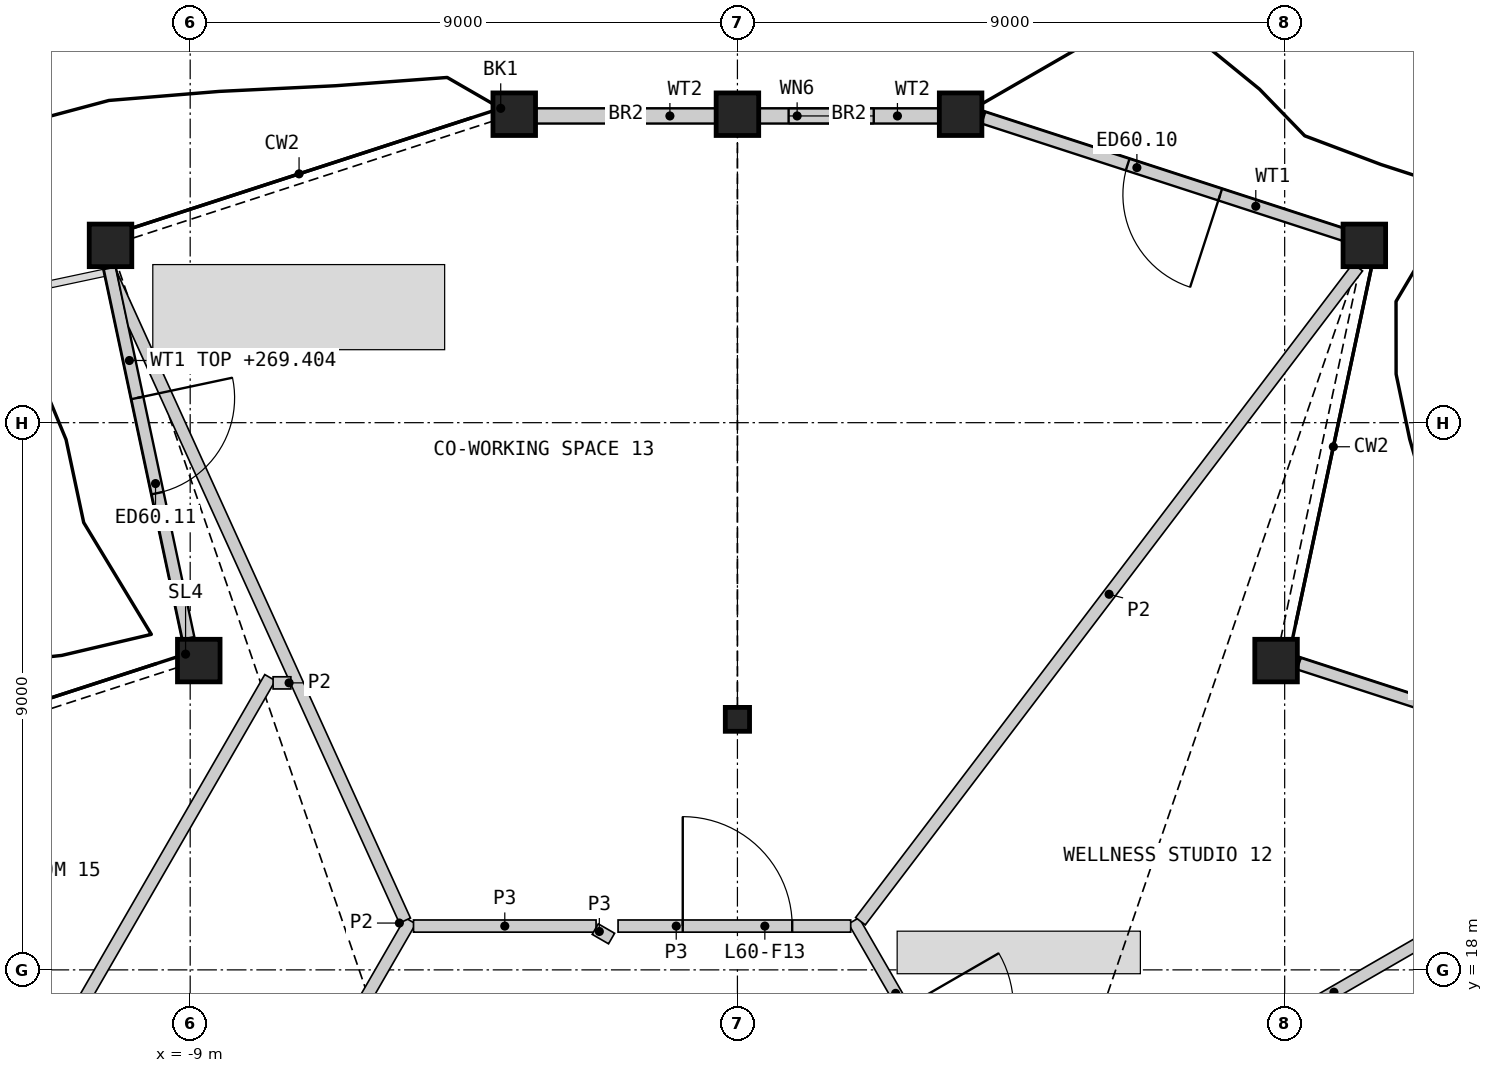
"""IFC4 building model, lengths in metres.
Left out: names, types, materials, properties, quantities, classifications, styles, units other than length and angle.
Written with IfcOpenShell. Run it as: python <this file> out.ifc"""

import sys

from ifc_helpers import new_model, si_unit, direction, frame, frame_2d, origin, origin_2d, place, context, subcontext, project, spatial, polyline, rectangle, hollow_rectangle, i_section, outline, extrude, element, fill, save


model = new_model("IFC4")
c1 = context("Model", 3, precision=1e-05, world=origin(), true_north=direction((0.0, 1.0)))
c2 = subcontext(c1, "Body", "Model", "MODEL_VIEW")
j1 = project(units=[si_unit("LENGTHUNIT", "METRE"), si_unit("PLANEANGLEUNIT", "RADIAN")], contexts=[c1])
p1 = place(None, origin())
s1 = spatial("IfcSite", under=j1, at=p1, CompositionType="ELEMENT")
p2 = place(p1, origin())
s2 = spatial("IfcBuilding", under=s1, at=p2, CompositionType="ELEMENT")
p3 = place(p2, frame((0.0, 0.0, 267.0)))
s3 = spatial("IfcBuildingStorey", under=s2, at=p3, CompositionType="ELEMENT", Elevation=267.0)
for number, where, z_axis, x_axis in (
    (1, (8.859, 23.087, 0.0), (0.0, 0.0, 1.0), (1.0, 0.0, 0.0)),
    (2, (10.31, 29.916, 0.0), (0.0, 0.0, 1.0), (1.0, 0.0, 0.0)),
    (3, (3.67, 32.073, 0.0), (0.0, 0.0, 1.0), (1.0, 0.0, 0.0)),
    (4, (0.0, 32.073, 0.0), (0.0, 0.0, 1.0), (1.0, 0.0, 0.0)),
    (5, (-3.67, 32.073, 0.0), (0.0, 0.0, 1.0), (1.0, 0.0, 0.0)),
    (6, (-10.31, 29.916, 0.0), (0.0, 0.0, 1.0), (1.0, 0.0, 0.0)),
    (7, (-8.859, 23.087, 0.0), (0.0, 0.0, 1.0), (1.0, 0.0, 0.0)),
):
    element("IfcColumn", number, at=place(p3, frame(where, z_axis=z_axis, x_axis=x_axis)), inside=s3, PredefinedType="COLUMN", context=c2, shape_type="SweptSolid", body=[
        extrude(hollow_rectangle(XDim=0.7, YDim=0.7, WallThickness=0.045, at=origin_2d()), origin(), (0.0, 0.0, 1.0), 3.6),
    ])
p4 = place(p3, frame((0.0, 22.121, 0.0), z_axis=(0.0, 0.0, 1.0), x_axis=(1.0, 0.0, 0.0)))
e8 = element("IfcColumn", 8, at=p4, inside=s3, PredefinedType="COLUMN", context=c2, shape_type="SweptSolid", body=[
    extrude(i_section(OverallWidth=0.399, OverallDepth=0.393, WebThickness=0.023, FlangeThickness=0.037, at=origin_2d()), origin(), (0.0, 0.0, 1.0), 3.6),
])
p5 = place(p3, frame((15.201, 21.098, 0.0), z_axis=(0.0, 0.0, 1.0), x_axis=(-0.95105665506, 0.309016567299, 0.0)))
e9 = element("IfcWall", 9, at=p5, inside=s3, PredefinedType="SOLIDWALL", context=c2, shape_type="SweptSolid", body=[
    extrude(rectangle(XDim=6.275, YDim=0.2, at=frame_2d((3.137, 0.0))), origin(), (0.0, 0.0, 1.0), 2.701),
])
p6 = place(p5, frame((2.186, 0.0, 0.0)))
e10 = element("IfcOpeningElement", 10, at=p6, cuts=e9, PredefinedType="OPENING", context=c2, shape_type="SweptSolid", body=[
    extrude(rectangle(XDim=1.6, YDim=2.4, at=frame_2d((0.8, 1.2))), frame((0.0, 0.11, 0.0), z_axis=(0.0, -1.0, 0.0), x_axis=(1.0, 0.0, 0.0)), (0.0, 0.0, 1.0), 0.22),
])
p7 = place(p3, frame((10.018, 30.074, 0.0), z_axis=(0.0, 0.0, 1.0), x_axis=(-0.951062060282, 0.308999931218, 0.0)))
e11 = element("IfcWall", 11, at=p7, inside=s3, PredefinedType="SOLIDWALL", context=c2, shape_type="SweptSolid", body=[
    extrude(rectangle(XDim=6.281, YDim=0.2, at=frame_2d((3.14, 0.0))), origin(), (0.0, 0.0, 1.0), 2.701),
])
p8 = place(p7, frame((2.186, 0.0, 0.0)))
e12 = element("IfcOpeningElement", 12, at=p8, cuts=e11, PredefinedType="OPENING", context=c2, shape_type="SweptSolid", body=[
    extrude(rectangle(XDim=1.6, YDim=2.4, at=frame_2d((0.8, 1.2))), frame((0.0, 0.11, 0.0), z_axis=(0.0, -1.0, 0.0), x_axis=(1.0, 0.0, 0.0)), (0.0, 0.0, 1.0), 0.22),
])
p9 = place(p3, frame((3.392, 32.045, 0.0), z_axis=(0.0, 0.0, 1.0), x_axis=(-1.0, 0.0, 0.0)))
e13 = element("IfcWall", 13, at=p9, inside=s3, PredefinedType="SOLIDWALL", context=c2, shape_type="SweptSolid", body=[
    extrude(rectangle(XDim=3.042, YDim=0.25, at=frame_2d((1.521, 0.0))), origin(), (0.0, 0.0, 1.0), 2.701),
])
p10 = place(p9, frame((1.15, 0.0, 1.9)))
e14 = element("IfcOpeningElement", 14, at=p10, cuts=e13, PredefinedType="OPENING", context=c2, shape_type="SweptSolid", body=[
    extrude(rectangle(XDim=1.4, YDim=0.6, at=frame_2d((0.7, 0.3))), frame((0.0, 0.135, 0.0), z_axis=(0.0, -1.0, 0.0), x_axis=(1.0, 0.0, 0.0)), (0.0, 0.0, 1.0), 0.27),
])
p11 = place(p3, frame((-0.35, 32.045, 0.0), z_axis=(0.0, 0.0, 1.0), x_axis=(-1.0, 0.0, 0.0)))
e15 = element("IfcWall", 15, at=p11, inside=s3, PredefinedType="SOLIDWALL", context=c2, shape_type="SweptSolid", body=[
    extrude(rectangle(XDim=3.042, YDim=0.25, at=frame_2d((1.521, 0.0))), origin(), (0.0, 0.0, 1.0), 2.701),
])
p12 = place(p3, frame((-10.324, 29.545, 0.0), z_axis=(0.0, 0.0, 1.0), x_axis=(0.207930490886, -0.978143604467, 0.0)))
e16 = element("IfcWall", 16, at=p12, inside=s3, PredefinedType="SOLIDWALL", context=c2, shape_type="SweptSolid", body=[
    extrude(rectangle(XDim=6.228, YDim=0.2, at=frame_2d((3.114, 0.0))), origin(), (0.0, 0.0, 1.0), 2.404),
])
p13 = place(p12, frame((2.186, 0.0, 0.0)))
e17 = element("IfcOpeningElement", 17, at=p13, cuts=e16, PredefinedType="OPENING", context=c2, shape_type="SweptSolid", body=[
    extrude(rectangle(XDim=1.6, YDim=2.4, at=frame_2d((0.8, 1.2))), frame((0.0, 0.11, 0.0), z_axis=(0.0, -1.0, 0.0), x_axis=(1.0, 0.0, 0.0)), (0.0, 0.0, 1.0), 0.22),
])
p14 = place(p3, frame((-18.976, -4.747, 0.0), z_axis=(0.0, 0.0, 1.0), x_axis=(0.499999852422, 0.866025488988, 0.0)))
e18 = element("IfcWall", 18, at=p14, inside=s3, PredefinedType="PARTITIONING", context=c2, shape_type="SweptSolid", body=[
    extrude(rectangle(XDim=27.198, YDim=0.2, at=frame_2d((13.599, 0.0))), origin(), (0.0, 0.0, 1.0), 3.25),
])
p15 = place(p14, frame((19.886, 0.0, 0.0)))
e19 = element("IfcOpeningElement", 19, at=p15, cuts=e18, PredefinedType="OPENING", context=c2, shape_type="SweptSolid", body=[
    extrude(rectangle(XDim=0.95, YDim=2.1, at=frame_2d((0.475, 1.05))), frame((0.0, 0.11, 0.0), z_axis=(0.0, -1.0, 0.0), x_axis=(1.0, 0.0, 0.0)), (0.0, 0.0, 1.0), 0.22),
])
p16 = place(p14, frame((11.895, 0.0, 0.0)))
e20 = element("IfcOpeningElement", 20, at=p16, cuts=e18, PredefinedType="OPENING", context=c2, shape_type="SweptSolid", body=[
    extrude(rectangle(XDim=1.1, YDim=2.1, at=frame_2d((0.55, 1.05))), frame((0.0, 0.11, 0.0), z_axis=(0.0, -1.0, 0.0), x_axis=(1.0, 0.0, 0.0)), (0.0, 0.0, 1.0), 0.22),
])
p17 = place(p14, frame((1.152, 0.0, 0.0)))
e21 = element("IfcOpeningElement", 21, at=p17, cuts=e18, PredefinedType="OPENING", context=c2, shape_type="SweptSolid", body=[
    extrude(rectangle(XDim=0.95, YDim=2.1, at=frame_2d((0.475, 1.05))), frame((0.0, 0.11, 0.0), z_axis=(0.0, -1.0, 0.0), x_axis=(1.0, 0.0, 0.0)), (0.0, 0.0, 1.0), 0.22),
])
p18 = place(p3, frame((1.913, 18.807, 0.0), z_axis=(0.0, 0.0, 1.0), x_axis=(0.499984524817, -0.866034338201, 0.0)))
e22 = element("IfcWall", 22, at=p18, inside=s3, PredefinedType="PARTITIONING", context=c2, shape_type="SweptSolid", body=[
    extrude(rectangle(XDim=5.51, YDim=0.2, at=frame_2d((2.755, 0.0))), origin(), (0.0, 0.0, 1.0), 3.25),
])
p19 = place(p18, frame((1.655, 0.0, 0.0)))
e23 = element("IfcOpeningElement", 23, at=p19, cuts=e22, PredefinedType="OPENING", context=c2, shape_type="SweptSolid", body=[
    extrude(rectangle(XDim=1.8, YDim=2.1, at=frame_2d((0.9, 1.05))), frame((0.0, 0.11, 0.0), z_axis=(0.0, -1.0, 0.0), x_axis=(1.0, 0.0, 0.0)), (0.0, 0.0, 1.0), 0.22),
])
p20 = place(p3, frame((-1.963, 18.72, 0.0), z_axis=(0.0, 0.0, 1.0), x_axis=(1.0, 0.0, 0.0)))
e24 = element("IfcWall", 24, at=p20, inside=s3, PredefinedType="PARTITIONING", context=c2, shape_type="SweptSolid", body=[
    extrude(rectangle(XDim=3.826, YDim=0.2, at=frame_2d((1.913, 0.0))), origin(), (0.0, 0.0, 1.0), 3.25),
])
p21 = place(p20, frame((1.064, 0.0, 0.0)))
e25 = element("IfcOpeningElement", 25, at=p21, cuts=e24, PredefinedType="OPENING", context=c2, shape_type="SweptSolid", body=[
    extrude(rectangle(XDim=1.8, YDim=2.1, at=frame_2d((0.9, 1.05))), frame((0.0, 0.11, 0.0), z_axis=(0.0, -1.0, 0.0), x_axis=(1.0, 0.0, 0.0)), (0.0, 0.0, 1.0), 0.22),
])
p22 = place(p3, frame((-5.327, 18.72, 0.0), z_axis=(0.0, 0.0, 1.0), x_axis=(1.0, 0.0, 0.0)))
e26 = element("IfcWall", 26, at=p22, inside=s3, PredefinedType="PARTITIONING", context=c2, shape_type="SweptSolid", body=[
    extrude(rectangle(XDim=3.002, YDim=0.2, at=frame_2d((1.501, 0.0))), origin(), (0.0, 0.0, 1.0), 3.25),
])
p23 = place(p3, frame((-2.338, 18.67, 0.0), z_axis=(0.0, 0.0, 1.0), x_axis=(0.866054481515, -0.499949632511, 0.0)))
e27 = element("IfcWall", 27, at=p23, inside=s3, PredefinedType="PARTITIONING", context=c2, shape_type="SweptSolid", body=[
    extrude(rectangle(XDim=0.31, YDim=0.2, at=frame_2d((0.155, 0.0))), origin(), (0.0, 0.0, 1.0), 3.25),
])
p24 = place(p3, frame((-15.591, 9.117, 0.0), z_axis=(0.0, 0.0, 1.0), x_axis=(0.499994281579, 0.866028705291, 0.0)))
e28 = element("IfcWall", 28, at=p24, inside=s3, PredefinedType="PARTITIONING", context=c2, shape_type="SweptSolid", body=[
    extrude(rectangle(XDim=15.808, YDim=0.2, at=frame_2d((7.904, 0.0))), origin(), (0.0, 0.0, 1.0), 2.404),
])
p25 = place(p24, frame((8.283, 0.0, 0.0)))
e29 = element("IfcOpeningElement", 29, at=p25, cuts=e28, PredefinedType="OPENING", context=c2, shape_type="SweptSolid", body=[
    extrude(rectangle(XDim=0.95, YDim=2.1, at=frame_2d((0.475, 1.05))), frame((0.0, 0.11, 0.0), z_axis=(0.0, -1.0, 0.0), x_axis=(1.0, 0.0, 0.0)), (0.0, 0.0, 1.0), 0.22),
])
p26 = place(p3, frame((2.024, 18.8, 0.0), z_axis=(0.0, 0.0, 1.0), x_axis=(0.605225740135, 0.796053894832, 0.0)))
e30 = element("IfcWall", 30, at=p26, inside=s3, PredefinedType="PARTITIONING", context=c2, shape_type="SweptSolid", body=[
    extrude(rectangle(XDim=13.511, YDim=0.2, at=frame_2d((6.756, 0.0))), origin(), (0.0, 0.0, 1.0), 2.404),
])
p27 = place(p3, frame((4.482, 14.557, 0.0), z_axis=(0.0, 0.0, 1.0), x_axis=(0.866030620616, 0.499990964073, 0.0)))
e31 = element("IfcWall", 31, at=p27, inside=s3, PredefinedType="PARTITIONING", context=c2, shape_type="SweptSolid", body=[
    extrude(rectangle(XDim=12.304, YDim=0.2, at=frame_2d((6.152, 0.0))), origin(), (0.0, 0.0, 1.0), 2.404),
])
p28 = place(p3, origin())
e32 = element("IfcWall", 32, at=p28, inside=s3, PredefinedType="PARTITIONING", context=c2, shape_type="SweptSolid", body=[
    extrude(outline(polyline([(-5.56, 18.77), (-10.017, 28.582), (-10.21, 29.491), (-5.377, 18.853), (-5.56, 18.77)])), origin(), (0.0, 0.0, 1.0), 2.404),
])
p29 = place(p3, frame((-7.636, 22.72, 0.0), z_axis=(0.0, 0.0, 1.0), x_axis=(1.0, 0.0, 0.0)))
e33 = element("IfcWall", 33, at=p29, inside=s3, PredefinedType="PARTITIONING", context=c2, shape_type="SweptSolid", body=[
    extrude(rectangle(XDim=0.292, YDim=0.2, at=frame_2d((0.146, 0.0))), origin(), (0.0, 0.0, 1.0), 2.404),
])
p30 = place(p8, origin())
e34 = element("IfcDoor", 34, at=p30, inside=s3, OperationType="DOUBLE_DOOR_SINGLE_SWING", PredefinedType="DOOR", context=c2, shape_type="SweptSolid", body=[
    extrude(rectangle(XDim=1.6, YDim=2.4, at=frame_2d((0.8, 1.2))), frame((0.0, 0.025, 0.0), z_axis=(0.0, -1.0, 0.0), x_axis=(1.0, 0.0, 0.0)), (0.0, 0.0, 1.0), 0.05),
])
fill(e12, e34)
p31 = place(p10, origin())
e35 = element("IfcWindow", 35, at=p31, inside=s3, PartitioningType="SINGLE_PANEL", PredefinedType="WINDOW", context=c2, shape_type="SweptSolid", body=[
    extrude(rectangle(XDim=1.4, YDim=0.6, at=frame_2d((0.7, 0.3))), frame((0.0, 0.03, 0.0), z_axis=(0.0, -1.0, 0.0), x_axis=(1.0, 0.0, 0.0)), (0.0, 0.0, 1.0), 0.06),
])
fill(e14, e35)
p32 = place(p13, origin())
e36 = element("IfcDoor", 36, at=p32, inside=s3, OperationType="DOUBLE_DOOR_SINGLE_SWING", PredefinedType="DOOR", context=c2, shape_type="SweptSolid", body=[
    extrude(rectangle(XDim=1.6, YDim=2.4, at=frame_2d((0.8, 1.2))), frame((0.0, 0.025, 0.0), z_axis=(0.0, -1.0, 0.0), x_axis=(1.0, 0.0, 0.0)), (0.0, 0.0, 1.0), 0.05),
])
fill(e17, e36)
p33 = place(p21, origin())
e37 = element("IfcDoor", 37, at=p33, inside=s3, OperationType="DOUBLE_DOOR_SINGLE_SWING", PredefinedType="DOOR", context=c2, shape_type="SweptSolid", body=[
    extrude(rectangle(XDim=1.8, YDim=2.1, at=frame_2d((0.9, 1.05))), frame((0.0, 0.025, 0.0), z_axis=(0.0, -1.0, 0.0), x_axis=(1.0, 0.0, 0.0)), (0.0, 0.0, 1.0), 0.05),
])
fill(e25, e37)
save(model, sys.argv[1])
